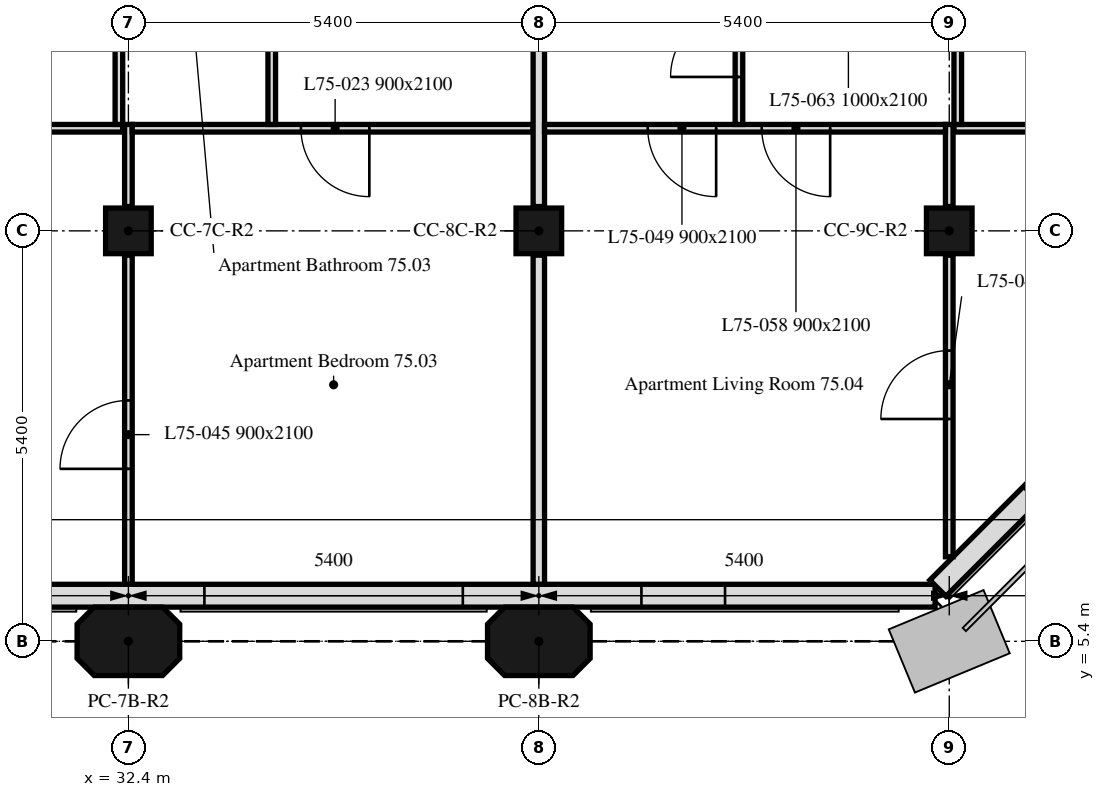
"""IFC4 building model, lengths in metres.
Left out: names, types, materials, properties, quantities, classifications, styles, units other than length and angle.
Written with IfcOpenShell. Run it as: python <this file> out.ifc"""

import sys

from ifc_helpers import new_model, si_unit, direction, frame, frame_2d, origin, origin_2d, place, context, subcontext, project, spatial, polyline, rectangle, outline, extrude, element, fill, save


model = new_model("IFC4")
c1 = context("Model", 3, precision=1e-05, world=origin(), true_north=direction((0.0, 1.0)))
c2 = subcontext(c1, "Body", "Model", "MODEL_VIEW")
j1 = project(units=[si_unit("LENGTHUNIT", "METRE"), si_unit("PLANEANGLEUNIT", "RADIAN")], contexts=[c1])
p1 = place(None, origin())
s1 = spatial("IfcSite", under=j1, at=p1, CompositionType="ELEMENT")
p2 = place(p1, origin())
s2 = spatial("IfcBuilding", under=s1, at=p2, CompositionType="ELEMENT")
p3 = place(p2, frame((0.0, 0.0, 301.6)))
s3 = spatial("IfcBuildingStorey", under=s2, at=p3, CompositionType="ELEMENT", Elevation=301.6)
for number, where, z_axis, x_axis in (
    (1, (32.4, 5.4, 0.0), (0.0, 0.0, 1.0), (1.0, 0.0, 0.0)),
    (2, (37.8, 5.4, 0.0), (0.0, 0.0, 1.0), (1.0, 0.0, 0.0)),
):
    element("IfcColumn", number, at=place(p3, frame(where, z_axis=z_axis, x_axis=x_axis)), inside=s3, PredefinedType="COLUMN", context=c2, shape_type="SweptSolid", body=[
        extrude(outline(polyline([(-0.45, -0.45), (0.45, -0.45), (0.675, -0.225), (0.675, 0.225), (0.45, 0.45), (-0.45, 0.45), (-0.675, 0.225), (-0.675, -0.225), (-0.45, -0.45)])), origin(), (0.0, 0.0, 1.0), 3.0),
    ])
for number, where, z_axis, x_axis in (
    (3, (32.4, 10.8, 0.0), (0.0, 0.0, 1.0), (1.0, 0.0, 0.0)),
    (4, (37.8, 10.8, 0.0), (0.0, 0.0, 1.0), (1.0, 0.0, 0.0)),
    (5, (43.2, 10.8, 0.0), (0.0, 0.0, 1.0), (1.0, 0.0, 0.0)),
):
    element("IfcColumn", number, at=place(p3, frame(where, z_axis=z_axis, x_axis=x_axis)), inside=s3, PredefinedType="COLUMN", context=c2, shape_type="SweptSolid", body=[
        extrude(rectangle(XDim=0.6, YDim=0.6, at=origin_2d()), origin(), (0.0, 0.0, 1.0), 3.0),
    ])
p4 = place(p3, frame((10.986, 6.0, 0.0), z_axis=(0.0, 0.0, 1.0), x_axis=(1.0, 0.0, 0.0)))
e6 = element("IfcWall", 6, at=p4, inside=s3, PredefinedType="SOLIDWALL", context=c2, shape_type="SweptSolid", body=[
    extrude(rectangle(XDim=32.027, YDim=0.3, at=frame_2d((16.014, 0.0))), origin(), (0.0, 0.0, 1.0), 3.0),
])
p5 = place(p4, frame((0.814, 0.0, 0.9)))
e7 = element("IfcOpeningElement", 7, at=p5, cuts=e6, PredefinedType="OPENING", context=c2, shape_type="SweptSolid", body=[
    extrude(rectangle(XDim=3.4, YDim=1.7, at=frame_2d((1.7, 0.85))), frame((0.0, 0.16, 0.0), z_axis=(0.0, -1.0, 0.0), x_axis=(1.0, 0.0, 0.0)), (0.0, 0.0, 1.0), 0.32),
])
p6 = place(p4, frame((6.564, 0.0, 0.9)))
e8 = element("IfcOpeningElement", 8, at=p6, cuts=e6, PredefinedType="OPENING", context=c2, shape_type="SweptSolid", body=[
    extrude(rectangle(XDim=1.1, YDim=1.7, at=frame_2d((0.55, 0.85))), frame((0.0, 0.16, 0.0), z_axis=(0.0, -1.0, 0.0), x_axis=(1.0, 0.0, 0.0)), (0.0, 0.0, 1.0), 0.32),
])
p7 = place(p4, frame((11.614, 0.0, 0.9)))
e9 = element("IfcOpeningElement", 9, at=p7, cuts=e6, PredefinedType="OPENING", context=c2, shape_type="SweptSolid", body=[
    extrude(rectangle(XDim=3.4, YDim=1.7, at=frame_2d((1.7, 0.85))), frame((0.0, 0.16, 0.0), z_axis=(0.0, -1.0, 0.0), x_axis=(1.0, 0.0, 0.0)), (0.0, 0.0, 1.0), 0.32),
])
p8 = place(p4, frame((17.364, 0.0, 0.9)))
e10 = element("IfcOpeningElement", 10, at=p8, cuts=e6, PredefinedType="OPENING", context=c2, shape_type="SweptSolid", body=[
    extrude(rectangle(XDim=1.1, YDim=1.7, at=frame_2d((0.55, 0.85))), frame((0.0, 0.16, 0.0), z_axis=(0.0, -1.0, 0.0), x_axis=(1.0, 0.0, 0.0)), (0.0, 0.0, 1.0), 0.32),
])
p9 = place(p4, frame((22.414, 0.0, 0.9)))
e11 = element("IfcOpeningElement", 11, at=p9, cuts=e6, PredefinedType="OPENING", context=c2, shape_type="SweptSolid", body=[
    extrude(rectangle(XDim=3.4, YDim=1.7, at=frame_2d((1.7, 0.85))), frame((0.0, 0.16, 0.0), z_axis=(0.0, -1.0, 0.0), x_axis=(1.0, 0.0, 0.0)), (0.0, 0.0, 1.0), 0.32),
])
p10 = place(p4, frame((28.164, 0.0, 0.9)))
e12 = element("IfcOpeningElement", 12, at=p10, cuts=e6, PredefinedType="OPENING", context=c2, shape_type="SweptSolid", body=[
    extrude(rectangle(XDim=1.1, YDim=1.7, at=frame_2d((0.55, 0.85))), frame((0.0, 0.16, 0.0), z_axis=(0.0, -1.0, 0.0), x_axis=(1.0, 0.0, 0.0)), (0.0, 0.0, 1.0), 0.32),
])
p11 = place(p3, frame((43.051, 6.099, 0.0), z_axis=(0.0, 0.0, 1.0), x_axis=(0.707106781187, 0.707106781187, 0.0)))
e13 = element("IfcWall", 13, at=p11, inside=s3, PredefinedType="SOLIDWALL", context=c2, shape_type="SweptSolid", body=[
    extrude(rectangle(XDim=6.86, YDim=0.3, at=frame_2d((3.43, 0.0))), origin(), (0.0, 0.0, 1.0), 3.0),
])
p12 = place(p11, frame((1.73, 0.0, 0.9)))
e14 = element("IfcOpeningElement", 14, at=p12, cuts=e13, PredefinedType="OPENING", context=c2, shape_type="SweptSolid", body=[
    extrude(rectangle(XDim=3.4, YDim=1.7, at=frame_2d((1.7, 0.85))), frame((0.0, 0.16, 0.0), z_axis=(0.0, -1.0, 0.0), x_axis=(1.0, 0.0, 0.0)), (0.0, 0.0, 1.0), 0.32),
])
p13 = place(p3, frame((32.4, 6.151, 0.0), z_axis=(0.0, 0.0, 1.0), x_axis=(0.0, 1.0, 0.0)))
e15 = element("IfcWall", 15, at=p13, inside=s3, PredefinedType="PARTITIONING", context=c2, shape_type="SweptSolid", body=[
    extrude(rectangle(XDim=4.329, YDim=0.1, at=frame_2d((2.165, 0.0))), origin(), (0.0, 0.0, 1.0), 3.0),
])
p14 = place(p13, frame((1.518, 0.0, 0.0)))
e16 = element("IfcOpeningElement", 16, at=p14, cuts=e15, PredefinedType="OPENING", context=c2, shape_type="SweptSolid", body=[
    extrude(rectangle(XDim=0.9, YDim=2.1, at=frame_2d((0.45, 1.05))), frame((0.0, 0.05, 0.0), z_axis=(0.0, -1.0, 0.0), x_axis=(1.0, 0.0, 0.0)), (0.0, 0.0, 1.0), 0.1),
])
p15 = place(p3, frame((32.4, 11.12, 0.0), z_axis=(0.0, 0.0, 1.0), x_axis=(0.0, 1.0, 0.0)))
e17 = element("IfcWall", 17, at=p15, inside=s3, PredefinedType="PARTITIONING", context=c2, shape_type="SweptSolid", body=[
    extrude(rectangle(XDim=1.08, YDim=0.1, at=frame_2d((0.54, 0.0))), origin(), (0.0, 0.0, 1.0), 3.0),
])
p16 = place(p3, frame((32.325, 12.15, 0.0), z_axis=(0.0, 0.0, 1.0), x_axis=(-1.0, 0.0, 0.0)))
e18 = element("IfcWall", 18, at=p16, inside=s3, PredefinedType="PARTITIONING", context=c2, shape_type="SweptSolid", body=[
    extrude(rectangle(XDim=5.25, YDim=0.1, at=frame_2d((2.625, 0.0))), origin(), (0.0, 0.0, 1.0), 3.0),
])
p17 = place(p16, frame((3.0, 0.0, 0.0)))
e19 = element("IfcOpeningElement", 19, at=p17, cuts=e18, PredefinedType="OPENING", context=c2, shape_type="SweptSolid", body=[
    extrude(rectangle(XDim=0.9, YDim=2.1, at=frame_2d((0.45, 1.05))), frame((0.0, 0.05, 0.0), z_axis=(0.0, -1.0, 0.0), x_axis=(1.0, 0.0, 0.0)), (0.0, 0.0, 1.0), 0.1),
])
p18 = place(p16, frame((1.5, 0.0, 0.0)))
e20 = element("IfcOpeningElement", 20, at=p18, cuts=e18, PredefinedType="OPENING", context=c2, shape_type="SweptSolid", body=[
    extrude(rectangle(XDim=0.9, YDim=2.1, at=frame_2d((0.45, 1.05))), frame((0.0, 0.05, 0.0), z_axis=(0.0, -1.0, 0.0), x_axis=(1.0, 0.0, 0.0)), (0.0, 0.0, 1.0), 0.1),
])
p19 = place(p3, frame((37.8, 6.151, 0.0), z_axis=(0.0, 0.0, 1.0), x_axis=(0.0, 1.0, 0.0)))
e21 = element("IfcWall", 21, at=p19, inside=s3, PredefinedType="PARTITIONING", context=c2, shape_type="SweptSolid", body=[
    extrude(rectangle(XDim=4.329, YDim=0.15, at=frame_2d((2.165, 0.0))), origin(), (0.0, 0.0, 1.0), 3.0),
])
p20 = place(p3, frame((37.725, 12.15, 0.0), z_axis=(0.0, 0.0, 1.0), x_axis=(-1.0, 0.0, 0.0)))
e22 = element("IfcWall", 22, at=p20, inside=s3, PredefinedType="PARTITIONING", context=c2, shape_type="SweptSolid", body=[
    extrude(rectangle(XDim=5.275, YDim=0.1, at=frame_2d((2.638, 0.0))), origin(), (0.0, 0.0, 1.0), 3.0),
])
p21 = place(p20, frame((2.155, 0.0, 0.0)))
e23 = element("IfcOpeningElement", 23, at=p21, cuts=e22, PredefinedType="OPENING", context=c2, shape_type="SweptSolid", body=[
    extrude(rectangle(XDim=0.9, YDim=2.1, at=frame_2d((0.45, 1.05))), frame((0.0, 0.05, 0.0), z_axis=(0.0, -1.0, 0.0), x_axis=(1.0, 0.0, 0.0)), (0.0, 0.0, 1.0), 0.1),
])
p22 = place(p3, frame((32.275, 12.2, 0.0), z_axis=(0.0, 0.0, 1.0), x_axis=(0.0, 1.0, 0.0)))
e24 = element("IfcWall", 24, at=p22, inside=s3, PredefinedType="PARTITIONING", context=c2, shape_type="SweptSolid", body=[
    extrude(rectangle(XDim=2.125, YDim=0.1, at=frame_2d((1.062, 0.0))), origin(), (0.0, 0.0, 1.0), 3.0),
])
p23 = place(p22, frame((0.975, 0.0, 0.0)))
e25 = element("IfcOpeningElement", 25, at=p23, cuts=e24, PredefinedType="OPENING", context=c2, shape_type="SweptSolid", body=[
    extrude(rectangle(XDim=0.9, YDim=2.1, at=frame_2d((0.45, 1.05))), frame((0.0, 0.05, 0.0), z_axis=(0.0, -1.0, 0.0), x_axis=(1.0, 0.0, 0.0)), (0.0, 0.0, 1.0), 0.1),
])
p24 = place(p3, frame((34.286, 12.2, 0.0), z_axis=(0.0, 0.0, 1.0), x_axis=(0.0, 1.0, 0.0)))
e26 = element("IfcWall", 26, at=p24, inside=s3, PredefinedType="PARTITIONING", context=c2, shape_type="SweptSolid", body=[
    extrude(rectangle(XDim=2.125, YDim=0.1, at=frame_2d((1.062, 0.0))), origin(), (0.0, 0.0, 1.0), 3.0),
])
p25 = place(p3, frame((37.8, 11.12, 0.0), z_axis=(0.0, 0.0, 1.0), x_axis=(0.0, 1.0, 0.0)))
e27 = element("IfcWall", 27, at=p25, inside=s3, PredefinedType="PARTITIONING", context=c2, shape_type="SweptSolid", body=[
    extrude(rectangle(XDim=3.205, YDim=0.15, at=frame_2d((1.603, 0.0))), origin(), (0.0, 0.0, 1.0), 3.0),
])
p26 = place(p3, frame((43.2, 6.512, 0.0), z_axis=(0.0, 0.0, 1.0), x_axis=(0.0, 1.0, 0.0)))
e28 = element("IfcWall", 28, at=p26, inside=s3, PredefinedType="PARTITIONING", context=c2, shape_type="SweptSolid", body=[
    extrude(rectangle(XDim=3.968, YDim=0.1, at=frame_2d((1.984, 0.0))), origin(), (0.0, 0.0, 1.0), 3.0),
])
p27 = place(p26, frame((1.813, 0.0, 0.0)))
e29 = element("IfcOpeningElement", 29, at=p27, cuts=e28, PredefinedType="OPENING", context=c2, shape_type="SweptSolid", body=[
    extrude(rectangle(XDim=0.9, YDim=2.1, at=frame_2d((0.45, 1.05))), frame((0.0, 0.05, 0.0), z_axis=(0.0, -1.0, 0.0), x_axis=(1.0, 0.0, 0.0)), (0.0, 0.0, 1.0), 0.1),
])
p28 = place(p3, frame((43.2, 11.12, 0.0), z_axis=(0.0, 0.0, 1.0), x_axis=(0.0, 1.0, 0.0)))
e30 = element("IfcWall", 30, at=p28, inside=s3, PredefinedType="PARTITIONING", context=c2, shape_type="SweptSolid", body=[
    extrude(rectangle(XDim=1.08, YDim=0.1, at=frame_2d((0.54, 0.0))), origin(), (0.0, 0.0, 1.0), 3.0),
])
p29 = place(p3, frame((43.15, 12.15, 0.0), z_axis=(0.0, 0.0, 1.0), x_axis=(-1.0, 0.0, 0.0)))
e31 = element("IfcWall", 31, at=p29, inside=s3, PredefinedType="PARTITIONING", context=c2, shape_type="SweptSolid", body=[
    extrude(rectangle(XDim=5.275, YDim=0.1, at=frame_2d((2.637, 0.0))), origin(), (0.0, 0.0, 1.0), 3.0),
])
p30 = place(p29, frame((3.017, 0.0, 0.0)))
e32 = element("IfcOpeningElement", 32, at=p30, cuts=e31, PredefinedType="OPENING", context=c2, shape_type="SweptSolid", body=[
    extrude(rectangle(XDim=0.9, YDim=2.1, at=frame_2d((0.45, 1.05))), frame((0.0, 0.05, 0.0), z_axis=(0.0, -1.0, 0.0), x_axis=(1.0, 0.0, 0.0)), (0.0, 0.0, 1.0), 0.1),
])
p31 = place(p29, frame((1.517, 0.0, 0.0)))
e33 = element("IfcOpeningElement", 33, at=p31, cuts=e31, PredefinedType="OPENING", context=c2, shape_type="SweptSolid", body=[
    extrude(rectangle(XDim=0.9, YDim=2.1, at=frame_2d((0.45, 1.05))), frame((0.0, 0.05, 0.0), z_axis=(0.0, -1.0, 0.0), x_axis=(1.0, 0.0, 0.0)), (0.0, 0.0, 1.0), 0.1),
])
p32 = place(p3, frame((47.849, 12.15, 0.0), z_axis=(0.0, 0.0, 1.0), x_axis=(-1.0, 0.0, 0.0)))
e34 = element("IfcWall", 34, at=p32, inside=s3, PredefinedType="PARTITIONING", context=c2, shape_type="SweptSolid", body=[
    extrude(rectangle(XDim=4.587, YDim=0.1, at=frame_2d((2.293, 0.0))), origin(), (0.0, 0.0, 1.0), 3.0),
])
p33 = place(p32, frame((0.418, 0.0, 0.0)))
e35 = element("IfcOpeningElement", 35, at=p33, cuts=e34, PredefinedType="OPENING", context=c2, shape_type="SweptSolid", body=[
    extrude(rectangle(XDim=0.9, YDim=2.1, at=frame_2d((0.45, 1.05))), frame((0.0, 0.05, 0.0), z_axis=(0.0, -1.0, 0.0), x_axis=(1.0, 0.0, 0.0)), (0.0, 0.0, 1.0), 0.1),
])
p34 = place(p3, frame((40.433, 12.2, 0.0), z_axis=(0.0, 0.0, 1.0), x_axis=(0.0, 1.0, 0.0)))
e36 = element("IfcWall", 36, at=p34, inside=s3, PredefinedType="PARTITIONING", context=c2, shape_type="SweptSolid", body=[
    extrude(rectangle(XDim=2.125, YDim=0.1, at=frame_2d((1.062, 0.0))), origin(), (0.0, 0.0, 1.0), 3.0),
])
p35 = place(p34, frame((0.625, 0.0, 0.0)))
e37 = element("IfcOpeningElement", 37, at=p35, cuts=e36, PredefinedType="OPENING", context=c2, shape_type="SweptSolid", body=[
    extrude(rectangle(XDim=0.9, YDim=2.1, at=frame_2d((0.45, 1.05))), frame((0.0, 0.05, 0.0), z_axis=(0.0, -1.0, 0.0), x_axis=(1.0, 0.0, 0.0)), (0.0, 0.0, 1.0), 0.1),
])
p36 = place(p3, frame((43.312, 12.2, 0.0), z_axis=(0.0, 0.0, 1.0), x_axis=(0.0, 1.0, 0.0)))
e38 = element("IfcWall", 38, at=p36, inside=s3, PredefinedType="PARTITIONING", context=c2, shape_type="SweptSolid", body=[
    extrude(rectangle(XDim=2.125, YDim=0.1, at=frame_2d((1.062, 0.0))), origin(), (0.0, 0.0, 1.0), 3.0),
])
p37 = place(p36, frame((0.975, 0.0, 0.0)))
e39 = element("IfcOpeningElement", 39, at=p37, cuts=e38, PredefinedType="OPENING", context=c2, shape_type="SweptSolid", body=[
    extrude(rectangle(XDim=0.9, YDim=2.1, at=frame_2d((0.45, 1.05))), frame((0.0, 0.05, 0.0), z_axis=(0.0, -1.0, 0.0), x_axis=(1.0, 0.0, 0.0)), (0.0, 0.0, 1.0), 0.1),
])
p38 = place(p9, origin())
e40 = element("IfcWindow", 40, at=p38, inside=s3, PartitioningType="SINGLE_PANEL", PredefinedType="WINDOW", context=c2, shape_type="SweptSolid", body=[
    extrude(rectangle(XDim=3.4, YDim=1.7, at=frame_2d((1.7, 0.85))), frame((0.0, 0.03, 0.0), z_axis=(0.0, -1.0, 0.0), x_axis=(1.0, 0.0, 0.0)), (0.0, 0.0, 1.0), 0.06),
])
fill(e11, e40)
p39 = place(p10, origin())
e41 = element("IfcWindow", 41, at=p39, inside=s3, PartitioningType="SINGLE_PANEL", PredefinedType="WINDOW", context=c2, shape_type="SweptSolid", body=[
    extrude(rectangle(XDim=1.1, YDim=1.7, at=frame_2d((0.55, 0.85))), frame((0.0, 0.03, 0.0), z_axis=(0.0, -1.0, 0.0), x_axis=(1.0, 0.0, 0.0)), (0.0, 0.0, 1.0), 0.06),
])
fill(e12, e41)
p40 = place(p21, origin())
e42 = element("IfcDoor", 42, at=p40, inside=s3, OperationType="SINGLE_SWING_RIGHT", PredefinedType="DOOR", context=c2, shape_type="SweptSolid", body=[
    extrude(rectangle(XDim=0.9, YDim=2.1, at=frame_2d((0.45, 1.05))), frame((0.0, 0.025, 0.0), z_axis=(0.0, -1.0, 0.0), x_axis=(1.0, 0.0, 0.0)), (0.0, 0.0, 1.0), 0.05),
])
fill(e23, e42)
p41 = place(p14, origin())
e43 = element("IfcDoor", 43, at=p41, inside=s3, OperationType="SINGLE_SWING_RIGHT", PredefinedType="DOOR", context=c2, shape_type="SweptSolid", body=[
    extrude(rectangle(XDim=0.9, YDim=2.1, at=frame_2d((0.45, 1.05))), frame((0.0, 0.025, 0.0), z_axis=(0.0, -1.0, 0.0), x_axis=(1.0, 0.0, 0.0)), (0.0, 0.0, 1.0), 0.05),
])
fill(e16, e43)
p42 = place(p27, origin())
e44 = element("IfcDoor", 44, at=p42, inside=s3, OperationType="SINGLE_SWING_RIGHT", PredefinedType="DOOR", context=c2, shape_type="SweptSolid", body=[
    extrude(rectangle(XDim=0.9, YDim=2.1, at=frame_2d((0.45, 1.05))), frame((0.0, 0.025, 0.0), z_axis=(0.0, -1.0, 0.0), x_axis=(1.0, 0.0, 0.0)), (0.0, 0.0, 1.0), 0.05),
])
fill(e29, e44)
p43 = place(p30, origin())
e45 = element("IfcDoor", 45, at=p43, inside=s3, OperationType="SINGLE_SWING_RIGHT", PredefinedType="DOOR", context=c2, shape_type="SweptSolid", body=[
    extrude(rectangle(XDim=0.9, YDim=2.1, at=frame_2d((0.45, 1.05))), frame((0.0, 0.025, 0.0), z_axis=(0.0, -1.0, 0.0), x_axis=(1.0, 0.0, 0.0)), (0.0, 0.0, 1.0), 0.05),
])
fill(e32, e45)
p44 = place(p35, origin())
e46 = element("IfcDoor", 46, at=p44, inside=s3, OperationType="SINGLE_SWING_LEFT", PredefinedType="DOOR", context=c2, shape_type="SweptSolid", body=[
    extrude(rectangle(XDim=0.9, YDim=2.1, at=frame_2d((0.45, 1.05))), frame((0.0, 0.025, 0.0), z_axis=(0.0, -1.0, 0.0), x_axis=(1.0, 0.0, 0.0)), (0.0, 0.0, 1.0), 0.05),
])
fill(e37, e46)
p45 = place(p31, origin())
e47 = element("IfcDoor", 47, at=p45, inside=s3, OperationType="SINGLE_SWING_LEFT", PredefinedType="DOOR", context=c2, shape_type="SweptSolid", body=[
    extrude(rectangle(XDim=0.9, YDim=2.1, at=frame_2d((0.45, 1.05))), frame((0.0, 0.025, 0.0), z_axis=(0.0, -1.0, 0.0), x_axis=(1.0, 0.0, 0.0)), (0.0, 0.0, 1.0), 0.05),
])
fill(e33, e47)
save(model, sys.argv[1])
